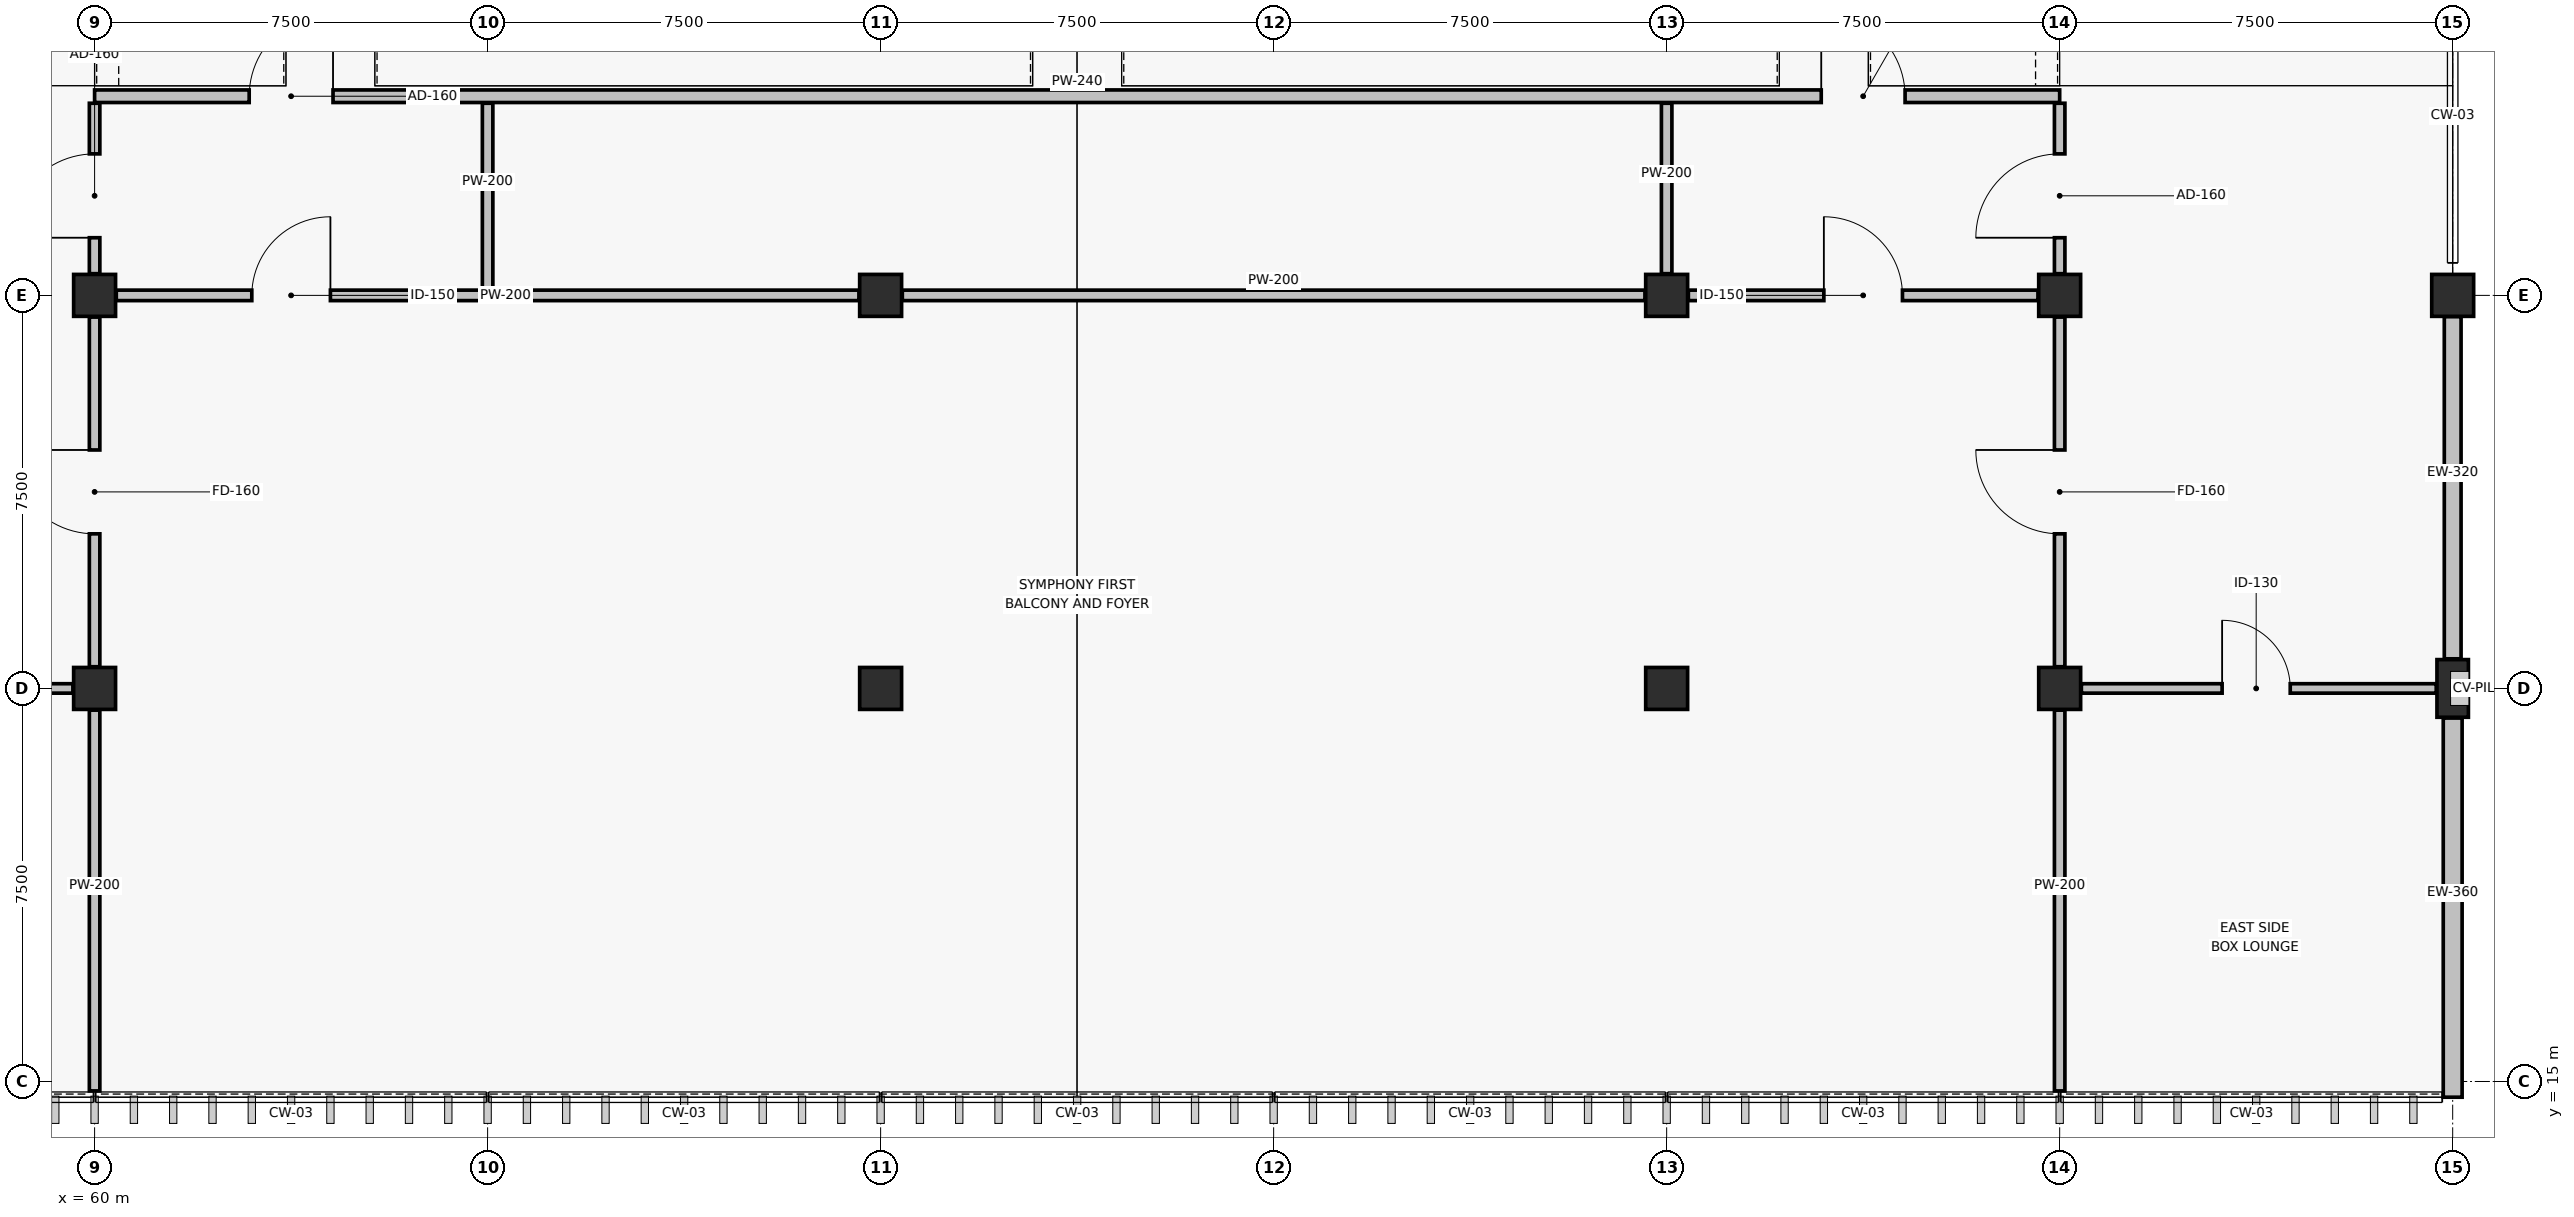
"""IFC4 building model, lengths in metres.
Left out: names, types, materials, properties, quantities, classifications, styles, units other than length and angle.
Written with IfcOpenShell. Run it as: python <this file> out.ifc"""

import sys

from ifc_helpers import new_model, si_unit, direction, frame, frame_2d, origin, origin_2d, place, context, subcontext, project, spatial, rectangle, extrude, element, fill, save


model = new_model("IFC4")
c1 = context("Model", 3, precision=1e-05, world=origin(), true_north=direction((0.0, 1.0)))
c2 = subcontext(c1, "Body", "Model", "MODEL_VIEW")
j1 = project(units=[si_unit("LENGTHUNIT", "METRE"), si_unit("PLANEANGLEUNIT", "RADIAN")], contexts=[c1])
p1 = place(None, origin())
s1 = spatial("IfcSite", under=j1, at=p1, CompositionType="ELEMENT")
p2 = place(p1, origin())
s2 = spatial("IfcBuilding", under=s1, at=p2, CompositionType="ELEMENT")
p3 = place(p2, frame((0.0, 0.0, 9.0)))
s3 = spatial("IfcBuildingStorey", under=s2, at=p3, CompositionType="ELEMENT", Elevation=9.0)
for number, where, z_axis, x_axis in (
    (1, (60.0, 22.5, 0.0), (0.0, 0.0, 1.0), (1.0, 0.0, 0.0)),
    (2, (60.0, 30.0, 0.0), (0.0, 0.0, 1.0), (1.0, 0.0, 0.0)),
    (3, (75.0, 22.5, 0.0), (0.0, 0.0, 1.0), (1.0, 0.0, 0.0)),
    (4, (75.0, 30.0, 0.0), (0.0, 0.0, 1.0), (1.0, 0.0, 0.0)),
    (5, (90.0, 22.5, 0.0), (0.0, 0.0, 1.0), (1.0, 0.0, 0.0)),
    (6, (90.0, 30.0, 0.0), (0.0, 0.0, 1.0), (1.0, 0.0, 0.0)),
    (7, (97.5, 22.5, 0.0), (0.0, 0.0, 1.0), (1.0, 0.0, 0.0)),
    (8, (97.5, 30.0, 0.0), (0.0, 0.0, 1.0), (1.0, 0.0, 0.0)),
):
    element("IfcColumn", number, at=place(p3, frame(where, z_axis=z_axis, x_axis=x_axis)), inside=s3, PredefinedType="COLUMN", context=c2, shape_type="SweptSolid", body=[
        extrude(rectangle(XDim=0.8, YDim=0.8, at=origin_2d()), origin(), (0.0, 0.0, 1.0), 4.2),
    ])
p4 = place(p3, frame((105.0, 22.5, 0.0), z_axis=(0.0, 0.0, 1.0), x_axis=(1.0, 0.0, 0.0)))
e9 = element("IfcColumn", 9, at=p4, inside=s3, PredefinedType="COLUMN", context=c2, shape_type="SweptSolid", body=[
    extrude(rectangle(XDim=0.6, YDim=1.1, at=origin_2d()), origin(), (0.0, 0.0, 1.0), 4.2),
])
p5 = place(p3, frame((105.0, 30.0, 0.0), z_axis=(0.0, 0.0, 1.0), x_axis=(1.0, 0.0, 0.0)))
e10 = element("IfcColumn", 10, at=p5, inside=s3, PredefinedType="COLUMN", context=c2, shape_type="SweptSolid", body=[
    extrude(rectangle(XDim=0.8, YDim=0.8, at=origin_2d()), origin(), (0.0, 0.0, 1.0), 4.2),
])
p6 = place(p3, frame((105.0, 14.7, 0.0), z_axis=(0.0, 0.0, 1.0), x_axis=(0.0, 1.0, 0.0)))
e11 = element("IfcWall", 11, at=p6, inside=s3, PredefinedType="SOLIDWALL", context=c2, shape_type="SweptSolid", body=[
    extrude(rectangle(XDim=7.235, YDim=0.36, at=frame_2d((3.618, 0.0))), origin(), (0.0, 0.0, 1.0), 2.69),
])
p7 = place(p3, frame((105.0, 23.065, 0.0), z_axis=(0.0, 0.0, 1.0), x_axis=(0.0, 1.0, 0.0)))
e12 = element("IfcWall", 12, at=p7, inside=s3, PredefinedType="SOLIDWALL", context=c2, shape_type="SweptSolid", body=[
    extrude(rectangle(XDim=6.53, YDim=0.32, at=frame_2d((3.265, 0.0))), origin(), (0.0, 0.0, 1.0), 2.69),
])
p8 = place(p3, frame((52.814, 22.5, 0.0), z_axis=(0.0, 0.0, 1.0), x_axis=(1.0, 0.0, 0.0)))
e13 = element("IfcWall", 13, at=p8, inside=s3, PredefinedType="PARTITIONING", context=c2, shape_type="SweptSolid", body=[
    extrude(rectangle(XDim=6.772, YDim=0.18, at=frame_2d((3.386, 0.0))), origin(), (0.0, 0.0, 1.0), 2.69),
])
p9 = place(p8, frame((2.786, 0.0, 0.0)))
e14 = element("IfcOpeningElement", 14, at=p9, cuts=e13, PredefinedType="OPENING", context=c2, shape_type="SweptSolid", body=[
    extrude(rectangle(XDim=1.3, YDim=2.15, at=frame_2d((0.65, 1.075))), frame((0.0, 0.1, 0.0), z_axis=(0.0, -1.0, 0.0), x_axis=(1.0, 0.0, 0.0)), (0.0, 0.0, 1.0), 0.2),
])
p10 = place(p3, frame((97.914, 22.5, 0.0), z_axis=(0.0, 0.0, 1.0), x_axis=(1.0, 0.0, 0.0)))
e15 = element("IfcWall", 15, at=p10, inside=s3, PredefinedType="PARTITIONING", context=c2, shape_type="SweptSolid", body=[
    extrude(rectangle(XDim=6.772, YDim=0.18, at=frame_2d((3.386, 0.0))), origin(), (0.0, 0.0, 1.0), 2.69),
])
p11 = place(p10, frame((2.686, 0.0, 0.0)))
e16 = element("IfcOpeningElement", 16, at=p11, cuts=e15, PredefinedType="OPENING", context=c2, shape_type="SweptSolid", body=[
    extrude(rectangle(XDim=1.3, YDim=2.15, at=frame_2d((0.65, 1.075))), frame((0.0, 0.1, 0.0), z_axis=(0.0, -1.0, 0.0), x_axis=(1.0, 0.0, 0.0)), (0.0, 0.0, 1.0), 0.2),
])
p12 = place(p3, frame((60.414, 30.0, 0.0), z_axis=(0.0, 0.0, 1.0), x_axis=(1.0, 0.0, 0.0)))
e17 = element("IfcWall", 17, at=p12, inside=s3, PredefinedType="PARTITIONING", context=c2, shape_type="SweptSolid", body=[
    extrude(rectangle(XDim=14.172, YDim=0.2, at=frame_2d((7.086, 0.0))), origin(), (0.0, 0.0, 1.0), 2.69),
])
p13 = place(p12, frame((2.586, 0.0, 0.0)))
e18 = element("IfcOpeningElement", 18, at=p13, cuts=e17, PredefinedType="OPENING", context=c2, shape_type="SweptSolid", body=[
    extrude(rectangle(XDim=1.5, YDim=2.16, at=frame_2d((0.75, 1.08))), frame((0.0, 0.11, 0.0), z_axis=(0.0, -1.0, 0.0), x_axis=(1.0, 0.0, 0.0)), (0.0, 0.0, 1.0), 0.22),
])
p14 = place(p3, frame((75.414, 30.0, 0.0), z_axis=(0.0, 0.0, 1.0), x_axis=(1.0, 0.0, 0.0)))
e19 = element("IfcWall", 19, at=p14, inside=s3, PredefinedType="PARTITIONING", context=c2, shape_type="SweptSolid", body=[
    extrude(rectangle(XDim=14.172, YDim=0.2, at=frame_2d((7.086, 0.0))), origin(), (0.0, 0.0, 1.0), 2.82),
])
p15 = place(p3, frame((90.414, 30.0, 0.0), z_axis=(0.0, 0.0, 1.0), x_axis=(1.0, 0.0, 0.0)))
e20 = element("IfcWall", 20, at=p15, inside=s3, PredefinedType="PARTITIONING", context=c2, shape_type="SweptSolid", body=[
    extrude(rectangle(XDim=6.672, YDim=0.2, at=frame_2d((3.336, 0.0))), origin(), (0.0, 0.0, 1.0), 2.69),
])
p16 = place(p15, frame((2.586, 0.0, 0.0)))
e21 = element("IfcOpeningElement", 21, at=p16, cuts=e20, PredefinedType="OPENING", context=c2, shape_type="SweptSolid", body=[
    extrude(rectangle(XDim=1.5, YDim=2.16, at=frame_2d((0.75, 1.08))), frame((0.0, 0.11, 0.0), z_axis=(0.0, -1.0, 0.0), x_axis=(1.0, 0.0, 0.0)), (0.0, 0.0, 1.0), 0.22),
])
p17 = place(p3, frame((60.0, 33.8, 0.0), z_axis=(0.0, 0.0, 1.0), x_axis=(1.0, 0.0, 0.0)))
e22 = element("IfcWall", 22, at=p17, inside=s3, PredefinedType="PARTITIONING", context=c2, shape_type="SweptSolid", body=[
    extrude(rectangle(XDim=37.5, YDim=0.24, at=frame_2d((18.75, 0.0))), origin(), (0.0, 0.0, 1.0), 2.69),
])
p18 = place(p17, frame((2.95, 0.0, 0.0)))
e23 = element("IfcOpeningElement", 23, at=p18, cuts=e22, PredefinedType="OPENING", context=c2, shape_type="SweptSolid", body=[
    extrude(rectangle(XDim=1.6, YDim=2.16, at=frame_2d((0.8, 1.08))), frame((0.0, 0.13, 0.0), z_axis=(0.0, -1.0, 0.0), x_axis=(1.0, 0.0, 0.0)), (0.0, 0.0, 1.0), 0.26),
])
p19 = place(p17, frame((32.95, 0.0, 0.0)))
e24 = element("IfcOpeningElement", 24, at=p19, cuts=e22, PredefinedType="OPENING", context=c2, shape_type="SweptSolid", body=[
    extrude(rectangle(XDim=1.6, YDim=2.16, at=frame_2d((0.8, 1.08))), frame((0.0, 0.13, 0.0), z_axis=(0.0, -1.0, 0.0), x_axis=(1.0, 0.0, 0.0)), (0.0, 0.0, 1.0), 0.26),
])
p20 = place(p3, frame((67.5, 30.114, 0.0), z_axis=(0.0, 0.0, 1.0), x_axis=(0.0, 1.0, 0.0)))
e25 = element("IfcWall", 25, at=p20, inside=s3, PredefinedType="PARTITIONING", context=c2, shape_type="SweptSolid", body=[
    extrude(rectangle(XDim=3.552, YDim=0.2, at=frame_2d((1.776, 0.0))), origin(), (0.0, 0.0, 1.0), 2.87),
])
p21 = place(p3, frame((90.0, 30.414, 0.0), z_axis=(0.0, 0.0, 1.0), x_axis=(0.0, 1.0, 0.0)))
e26 = element("IfcWall", 26, at=p21, inside=s3, PredefinedType="PARTITIONING", context=c2, shape_type="SweptSolid", body=[
    extrude(rectangle(XDim=3.252, YDim=0.2, at=frame_2d((1.626, 0.0))), origin(), (0.0, 0.0, 1.0), 2.82),
])
p22 = place(p3, frame((60.0, 14.82, 0.0), z_axis=(0.0, 0.0, 1.0), x_axis=(0.0, 1.0, 0.0)))
e27 = element("IfcWall", 27, at=p22, inside=s3, PredefinedType="PARTITIONING", context=c2, shape_type="SweptSolid", body=[
    extrude(rectangle(XDim=7.266, YDim=0.2, at=frame_2d((3.633, 0.0))), origin(), (0.0, 0.0, 1.0), 2.69),
])
p23 = place(p3, frame((60.0, 22.914, 0.0), z_axis=(0.0, 0.0, 1.0), x_axis=(0.0, 1.0, 0.0)))
e28 = element("IfcWall", 28, at=p23, inside=s3, PredefinedType="PARTITIONING", context=c2, shape_type="SweptSolid", body=[
    extrude(rectangle(XDim=6.672, YDim=0.2, at=frame_2d((3.336, 0.0))), origin(), (0.0, 0.0, 1.0), 2.69),
])
p24 = place(p23, frame((2.536, 0.0, 0.0)))
e29 = element("IfcOpeningElement", 29, at=p24, cuts=e28, PredefinedType="OPENING", context=c2, shape_type="SweptSolid", body=[
    extrude(rectangle(XDim=1.6, YDim=2.15, at=frame_2d((0.8, 1.075))), frame((0.0, 0.11, 0.0), z_axis=(0.0, -1.0, 0.0), x_axis=(1.0, 0.0, 0.0)), (0.0, 0.0, 1.0), 0.22),
])
p25 = place(p3, frame((60.0, 30.414, 0.0), z_axis=(0.0, 0.0, 1.0), x_axis=(0.0, 1.0, 0.0)))
e30 = element("IfcWall", 30, at=p25, inside=s3, PredefinedType="PARTITIONING", context=c2, shape_type="SweptSolid", body=[
    extrude(rectangle(XDim=3.252, YDim=0.2, at=frame_2d((1.626, 0.0))), origin(), (0.0, 0.0, 1.0), 2.69),
])
p26 = place(p25, frame((0.686, 0.0, 0.0)))
e31 = element("IfcOpeningElement", 31, at=p26, cuts=e30, PredefinedType="OPENING", context=c2, shape_type="SweptSolid", body=[
    extrude(rectangle(XDim=1.6, YDim=2.16, at=frame_2d((0.8, 1.08))), frame((0.0, 0.11, 0.0), z_axis=(0.0, -1.0, 0.0), x_axis=(1.0, 0.0, 0.0)), (0.0, 0.0, 1.0), 0.22),
])
p27 = place(p3, frame((97.5, 14.82, 0.0), z_axis=(0.0, 0.0, 1.0), x_axis=(0.0, 1.0, 0.0)))
e32 = element("IfcWall", 32, at=p27, inside=s3, PredefinedType="PARTITIONING", context=c2, shape_type="SweptSolid", body=[
    extrude(rectangle(XDim=7.266, YDim=0.2, at=frame_2d((3.633, 0.0))), origin(), (0.0, 0.0, 1.0), 2.69),
])
p28 = place(p3, frame((97.5, 22.914, 0.0), z_axis=(0.0, 0.0, 1.0), x_axis=(0.0, 1.0, 0.0)))
e33 = element("IfcWall", 33, at=p28, inside=s3, PredefinedType="PARTITIONING", context=c2, shape_type="SweptSolid", body=[
    extrude(rectangle(XDim=6.672, YDim=0.2, at=frame_2d((3.336, 0.0))), origin(), (0.0, 0.0, 1.0), 2.69),
])
p29 = place(p28, frame((2.536, 0.0, 0.0)))
e34 = element("IfcOpeningElement", 34, at=p29, cuts=e33, PredefinedType="OPENING", context=c2, shape_type="SweptSolid", body=[
    extrude(rectangle(XDim=1.6, YDim=2.15, at=frame_2d((0.8, 1.075))), frame((0.0, 0.11, 0.0), z_axis=(0.0, -1.0, 0.0), x_axis=(1.0, 0.0, 0.0)), (0.0, 0.0, 1.0), 0.22),
])
p30 = place(p3, frame((97.5, 30.414, 0.0), z_axis=(0.0, 0.0, 1.0), x_axis=(0.0, 1.0, 0.0)))
e35 = element("IfcWall", 35, at=p30, inside=s3, PredefinedType="PARTITIONING", context=c2, shape_type="SweptSolid", body=[
    extrude(rectangle(XDim=3.252, YDim=0.2, at=frame_2d((1.626, 0.0))), origin(), (0.0, 0.0, 1.0), 2.69),
])
p31 = place(p30, frame((0.686, 0.0, 0.0)))
e36 = element("IfcOpeningElement", 36, at=p31, cuts=e35, PredefinedType="OPENING", context=c2, shape_type="SweptSolid", body=[
    extrude(rectangle(XDim=1.6, YDim=2.16, at=frame_2d((0.8, 1.08))), frame((0.0, 0.11, 0.0), z_axis=(0.0, -1.0, 0.0), x_axis=(1.0, 0.0, 0.0)), (0.0, 0.0, 1.0), 0.22),
])
p32 = place(p11, origin())
e37 = element("IfcDoor", 37, at=p32, inside=s3, OperationType="SINGLE_SWING_LEFT", PredefinedType="DOOR", context=c2, shape_type="SweptSolid", body=[
    extrude(rectangle(XDim=1.3, YDim=2.15, at=frame_2d((0.65, 1.075))), frame((0.0, 0.025, 0.0), z_axis=(0.0, -1.0, 0.0), x_axis=(1.0, 0.0, 0.0)), (0.0, 0.0, 1.0), 0.05),
])
fill(e16, e37)
p33 = place(p13, origin())
e38 = element("IfcDoor", 38, at=p33, inside=s3, OperationType="SINGLE_SWING_RIGHT", PredefinedType="DOOR", context=c2, shape_type="SweptSolid", body=[
    extrude(rectangle(XDim=1.5, YDim=2.16, at=frame_2d((0.75, 1.08))), frame((0.0, 0.025, 0.0), z_axis=(0.0, -1.0, 0.0), x_axis=(1.0, 0.0, 0.0)), (0.0, 0.0, 1.0), 0.05),
])
fill(e18, e38)
p34 = place(p16, origin())
e39 = element("IfcDoor", 39, at=p34, inside=s3, OperationType="SINGLE_SWING_LEFT", PredefinedType="DOOR", context=c2, shape_type="SweptSolid", body=[
    extrude(rectangle(XDim=1.5, YDim=2.16, at=frame_2d((0.75, 1.08))), frame((0.0, 0.025, 0.0), z_axis=(0.0, -1.0, 0.0), x_axis=(1.0, 0.0, 0.0)), (0.0, 0.0, 1.0), 0.05),
])
fill(e21, e39)
p35 = place(p18, origin())
e40 = element("IfcDoor", 40, at=p35, inside=s3, OperationType="SINGLE_SWING_RIGHT", PredefinedType="DOOR", context=c2, shape_type="SweptSolid", body=[
    extrude(rectangle(XDim=1.6, YDim=2.16, at=frame_2d((0.8, 1.08))), frame((0.0, 0.025, 0.0), z_axis=(0.0, -1.0, 0.0), x_axis=(1.0, 0.0, 0.0)), (0.0, 0.0, 1.0), 0.05),
])
fill(e23, e40)
p36 = place(p19, origin())
e41 = element("IfcDoor", 41, at=p36, inside=s3, OperationType="SINGLE_SWING_LEFT", PredefinedType="DOOR", context=c2, shape_type="SweptSolid", body=[
    extrude(rectangle(XDim=1.6, YDim=2.16, at=frame_2d((0.8, 1.08))), frame((0.0, 0.025, 0.0), z_axis=(0.0, -1.0, 0.0), x_axis=(1.0, 0.0, 0.0)), (0.0, 0.0, 1.0), 0.05),
])
fill(e24, e41)
p37 = place(p24, origin())
e42 = element("IfcDoor", 42, at=p37, inside=s3, OperationType="SINGLE_SWING_RIGHT", PredefinedType="DOOR", context=c2, shape_type="SweptSolid", body=[
    extrude(rectangle(XDim=1.6, YDim=2.15, at=frame_2d((0.8, 1.075))), frame((0.0, 0.025, 0.0), z_axis=(0.0, -1.0, 0.0), x_axis=(1.0, 0.0, 0.0)), (0.0, 0.0, 1.0), 0.05),
])
fill(e29, e42)
p38 = place(p26, origin())
e43 = element("IfcDoor", 43, at=p38, inside=s3, OperationType="SINGLE_SWING_LEFT", PredefinedType="DOOR", context=c2, shape_type="SweptSolid", body=[
    extrude(rectangle(XDim=1.6, YDim=2.16, at=frame_2d((0.8, 1.08))), frame((0.0, 0.025, 0.0), z_axis=(0.0, -1.0, 0.0), x_axis=(1.0, 0.0, 0.0)), (0.0, 0.0, 1.0), 0.05),
])
fill(e31, e43)
p39 = place(p29, origin())
e44 = element("IfcDoor", 44, at=p39, inside=s3, OperationType="SINGLE_SWING_RIGHT", PredefinedType="DOOR", context=c2, shape_type="SweptSolid", body=[
    extrude(rectangle(XDim=1.6, YDim=2.15, at=frame_2d((0.8, 1.075))), frame((0.0, 0.025, 0.0), z_axis=(0.0, -1.0, 0.0), x_axis=(1.0, 0.0, 0.0)), (0.0, 0.0, 1.0), 0.05),
])
fill(e34, e44)
p40 = place(p31, origin())
e45 = element("IfcDoor", 45, at=p40, inside=s3, OperationType="SINGLE_SWING_LEFT", PredefinedType="DOOR", context=c2, shape_type="SweptSolid", body=[
    extrude(rectangle(XDim=1.6, YDim=2.16, at=frame_2d((0.8, 1.08))), frame((0.0, 0.025, 0.0), z_axis=(0.0, -1.0, 0.0), x_axis=(1.0, 0.0, 0.0)), (0.0, 0.0, 1.0), 0.05),
])
fill(e36, e45)
save(model, sys.argv[1])
